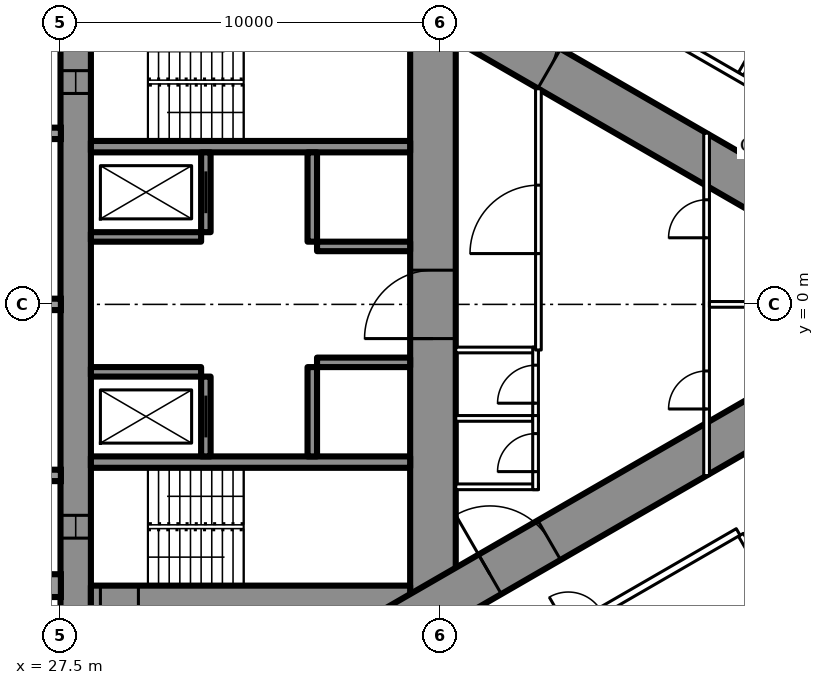
"""IFC4 building model, lengths in metres.
Left out: names, types, materials, properties, quantities, classifications, styles, units other than length and angle.
Written with IfcOpenShell. Run it as: python <this file> out.ifc"""

import sys

from ifc_helpers import new_model, si_unit, direction, frame, frame_2d, origin, place, context, subcontext, project, spatial, rectangle, extrude, element, fill, save


model = new_model("IFC4")
c1 = context("Model", 3, precision=1e-05, world=origin(), true_north=direction((0.0, 1.0)))
c2 = subcontext(c1, "Body", "Model", "MODEL_VIEW")
j1 = project(units=[si_unit("LENGTHUNIT", "METRE"), si_unit("PLANEANGLEUNIT", "RADIAN")], contexts=[c1])
p1 = place(None, origin())
s1 = spatial("IfcSite", under=j1, at=p1, CompositionType="ELEMENT")
p2 = place(p1, origin())
s2 = spatial("IfcBuilding", under=s1, at=p2, CompositionType="ELEMENT")
p3 = place(p2, frame((0.0, 0.0, 21.5)))
s3 = spatial("IfcBuildingStorey", under=s2, at=p3, CompositionType="ELEMENT", Elevation=21.5)
p4 = place(p3, frame((27.9, -8.6, 0.0), z_axis=(0.0, 0.0, 1.0), x_axis=(0.0, 1.0, 0.0)))
e1 = element("IfcWall", 1, at=p4, inside=s3, PredefinedType="SHEAR", context=c2, shape_type="SweptSolid", body=[
    extrude(rectangle(XDim=17.2, YDim=0.8, at=frame_2d((8.6, 0.0))), origin(), (0.0, 0.0, 1.0), 3.5),
])
p5 = place(p4, frame((2.45, 0.0, 0.6)))
e2 = element("IfcOpeningElement", 2, at=p5, cuts=e1, PredefinedType="OPENING", context=c2, shape_type="SweptSolid", body=[
    extrude(rectangle(XDim=0.6, YDim=2.1, at=frame_2d((0.3, 1.05))), frame((0.0, 0.41, 0.0), z_axis=(0.0, -1.0, 0.0), x_axis=(1.0, 0.0, 0.0)), (0.0, 0.0, 1.0), 0.82),
])
p6 = place(p4, frame((14.15, 0.0, 0.6)))
e3 = element("IfcOpeningElement", 3, at=p6, cuts=e1, PredefinedType="OPENING", context=c2, shape_type="SweptSolid", body=[
    extrude(rectangle(XDim=0.6, YDim=2.1, at=frame_2d((0.3, 1.05))), frame((0.0, 0.41, 0.0), z_axis=(0.0, -1.0, 0.0), x_axis=(1.0, 0.0, 0.0)), (0.0, 0.0, 1.0), 0.82),
])
p7 = place(p3, frame((37.3, -8.6, 0.0), z_axis=(0.0, 0.0, 1.0), x_axis=(0.0, 1.0, 0.0)))
e4 = element("IfcWall", 4, at=p7, inside=s3, PredefinedType="SHEAR", context=c2, shape_type="SweptSolid", body=[
    extrude(rectangle(XDim=17.2, YDim=1.2, at=frame_2d((8.6, 0.0))), origin(), (0.0, 0.0, 1.0), 3.5),
])
p8 = place(p7, frame((7.7, 0.0, 0.0)))
e5 = element("IfcOpeningElement", 5, at=p8, cuts=e4, PredefinedType="OPENING", context=c2, shape_type="SweptSolid", body=[
    extrude(rectangle(XDim=1.8, YDim=2.2, at=frame_2d((0.9, 1.1))), frame((0.0, 0.61, 0.0), z_axis=(0.0, -1.0, 0.0), x_axis=(1.0, 0.0, 0.0)), (0.0, 0.0, 1.0), 1.22),
])
p9 = place(p3, frame((28.3, -8.0, 0.0), z_axis=(0.0, 0.0, 1.0), x_axis=(1.0, 0.0, 0.0)))
e6 = element("IfcWall", 6, at=p9, inside=s3, PredefinedType="SHEAR", context=c2, shape_type="SweptSolid", body=[
    extrude(rectangle(XDim=8.4, YDim=1.2, at=frame_2d((4.2, 0.0))), origin(), (0.0, 0.0, 1.0), 3.5),
])
p10 = place(p9, frame((0.25, 0.0, 0.0)))
e7 = element("IfcOpeningElement", 7, at=p10, cuts=e6, PredefinedType="OPENING", context=c2, shape_type="SweptSolid", body=[
    extrude(rectangle(XDim=1.0, YDim=2.2, at=frame_2d((0.5, 1.1))), frame((0.0, 0.61, 0.0), z_axis=(0.0, -1.0, 0.0), x_axis=(1.0, 0.0, 0.0)), (0.0, 0.0, 1.0), 1.22),
])
for number, where, z_axis, x_axis in (
    (8, (28.3, -4.15, 0.0), (0.0, 0.0, 1.0), (1.0, 0.0, 0.0)),
    (9, (28.3, 4.15, 0.0), (0.0, 0.0, 1.0), (1.0, 0.0, 0.0)),
):
    element("IfcWall", number, at=place(p3, frame(where, z_axis=z_axis, x_axis=x_axis)), inside=s3, PredefinedType="SHEAR", context=c2, shape_type="SweptSolid", body=[
        extrude(rectangle(XDim=8.4, YDim=0.3, at=frame_2d((4.2, 0.0))), origin(), (0.0, 0.0, 1.0), 3.5),
    ])
p11 = place(p3, frame((31.325, -4.0, 0.0), z_axis=(0.0, 0.0, 1.0), x_axis=(0.0, 1.0, 0.0)))
e10 = element("IfcWall", 10, at=p11, inside=s3, PredefinedType="SHEAR", context=c2, shape_type="SweptSolid", body=[
    extrude(rectangle(XDim=2.1, YDim=0.25, at=frame_2d((1.05, 0.0))), origin(), (0.0, 0.0, 1.0), 3.5),
])
p12 = place(p11, frame((0.5, 0.0, 0.0)))
e11 = element("IfcOpeningElement", 11, at=p12, cuts=e10, PredefinedType="OPENING", context=c2, shape_type="SweptSolid", body=[
    extrude(rectangle(XDim=1.1, YDim=2.2, at=frame_2d((0.55, 1.1))), frame((0.0, 0.135, 0.0), z_axis=(0.0, -1.0, 0.0), x_axis=(1.0, 0.0, 0.0)), (0.0, 0.0, 1.0), 0.27),
])
p13 = place(p3, frame((34.125, -4.0, 0.0), z_axis=(0.0, 0.0, 1.0), x_axis=(0.0, 1.0, 0.0)))
e12 = element("IfcWall", 12, at=p13, inside=s3, PredefinedType="SHEAR", context=c2, shape_type="SweptSolid", body=[
    extrude(rectangle(XDim=2.35, YDim=0.25, at=frame_2d((1.175, 0.0))), origin(), (0.0, 0.0, 1.0), 3.5),
])
p14 = place(p3, frame((28.3, -1.775, 0.0), z_axis=(0.0, 0.0, 1.0), x_axis=(1.0, 0.0, 0.0)))
e13 = element("IfcWall", 13, at=p14, inside=s3, PredefinedType="SHEAR", context=c2, shape_type="SweptSolid", body=[
    extrude(rectangle(XDim=2.9, YDim=0.25, at=frame_2d((1.45, 0.0))), origin(), (0.0, 0.0, 1.0), 3.5),
])
p15 = place(p3, frame((34.25, -1.525, 0.0), z_axis=(0.0, 0.0, 1.0), x_axis=(1.0, 0.0, 0.0)))
e14 = element("IfcWall", 14, at=p15, inside=s3, PredefinedType="SHEAR", context=c2, shape_type="SweptSolid", body=[
    extrude(rectangle(XDim=2.45, YDim=0.25, at=frame_2d((1.225, 0.0))), origin(), (0.0, 0.0, 1.0), 3.5),
])
p16 = place(p3, frame((31.325, 1.9, 0.0), z_axis=(0.0, 0.0, 1.0), x_axis=(0.0, 1.0, 0.0)))
e15 = element("IfcWall", 15, at=p16, inside=s3, PredefinedType="SHEAR", context=c2, shape_type="SweptSolid", body=[
    extrude(rectangle(XDim=2.1, YDim=0.25, at=frame_2d((1.05, 0.0))), origin(), (0.0, 0.0, 1.0), 3.5),
])
p17 = place(p16, frame((0.5, 0.0, 0.0)))
e16 = element("IfcOpeningElement", 16, at=p17, cuts=e15, PredefinedType="OPENING", context=c2, shape_type="SweptSolid", body=[
    extrude(rectangle(XDim=1.1, YDim=2.2, at=frame_2d((0.55, 1.1))), frame((0.0, 0.135, 0.0), z_axis=(0.0, -1.0, 0.0), x_axis=(1.0, 0.0, 0.0)), (0.0, 0.0, 1.0), 0.27),
])
p18 = place(p3, frame((34.125, 1.65, 0.0), z_axis=(0.0, 0.0, 1.0), x_axis=(0.0, 1.0, 0.0)))
e17 = element("IfcWall", 17, at=p18, inside=s3, PredefinedType="SHEAR", context=c2, shape_type="SweptSolid", body=[
    extrude(rectangle(XDim=2.35, YDim=0.25, at=frame_2d((1.175, 0.0))), origin(), (0.0, 0.0, 1.0), 3.5),
])
p19 = place(p3, frame((28.3, 1.775, 0.0), z_axis=(0.0, 0.0, 1.0), x_axis=(1.0, 0.0, 0.0)))
e18 = element("IfcWall", 18, at=p19, inside=s3, PredefinedType="SHEAR", context=c2, shape_type="SweptSolid", body=[
    extrude(rectangle(XDim=2.9, YDim=0.25, at=frame_2d((1.45, 0.0))), origin(), (0.0, 0.0, 1.0), 3.5),
])
p20 = place(p3, frame((34.25, 1.525, 0.0), z_axis=(0.0, 0.0, 1.0), x_axis=(1.0, 0.0, 0.0)))
e19 = element("IfcWall", 19, at=p20, inside=s3, PredefinedType="SHEAR", context=c2, shape_type="SweptSolid", body=[
    extrude(rectangle(XDim=2.45, YDim=0.25, at=frame_2d((1.225, 0.0))), origin(), (0.0, 0.0, 1.0), 3.5),
])
p21 = place(p3, frame((27.2, -13.8, 0.0), z_axis=(0.0, 0.0, 1.0), x_axis=(0.866027159892, 0.499996958321, 0.0)))
e20 = element("IfcWall", 20, at=p21, inside=s3, PredefinedType="SHEAR", context=c2, shape_type="SweptSolid", body=[
    extrude(rectangle(XDim=27.947, YDim=1.2, at=frame_2d((13.973, 0.0))), origin(), (0.0, 0.0, 1.0), 3.5),
])
p22 = place(p21, frame((4.6, 0.0, 0.0)))
e21 = element("IfcOpeningElement", 21, at=p22, cuts=e20, PredefinedType="OPENING", context=c2, shape_type="SweptSolid", body=[
    extrude(rectangle(XDim=1.0, YDim=2.2, at=frame_2d((0.5, 1.1))), frame((0.0, 0.61, 0.0), z_axis=(0.0, -1.0, 0.0), x_axis=(1.0, 0.0, 0.0)), (0.0, 0.0, 1.0), 1.22),
])
p23 = place(p21, frame((13.395, 0.0, 0.0)))
e22 = element("IfcOpeningElement", 22, at=p23, cuts=e20, PredefinedType="OPENING", context=c2, shape_type="SweptSolid", body=[
    extrude(rectangle(XDim=1.8, YDim=2.2, at=frame_2d((0.9, 1.1))), frame((0.0, 0.61, 0.0), z_axis=(0.0, -1.0, 0.0), x_axis=(1.0, 0.0, 0.0)), (0.0, 0.0, 1.0), 1.22),
])
p24 = place(p3, frame((27.2, 13.8, 0.0), z_axis=(0.0, 0.0, 1.0), x_axis=(0.866024515034, -0.500001539357, 0.0)))
e23 = element("IfcWall", 23, at=p24, inside=s3, PredefinedType="SHEAR", context=c2, shape_type="SweptSolid", body=[
    extrude(rectangle(XDim=26.907, YDim=1.2, at=frame_2d((13.454, 0.0))), origin(), (0.0, 0.0, 1.0), 3.5),
])
p25 = place(p24, frame((4.6, 0.0, 0.0)))
e24 = element("IfcOpeningElement", 24, at=p25, cuts=e23, PredefinedType="OPENING", context=c2, shape_type="SweptSolid", body=[
    extrude(rectangle(XDim=1.0, YDim=2.2, at=frame_2d((0.5, 1.1))), frame((0.0, 0.61, 0.0), z_axis=(0.0, -1.0, 0.0), x_axis=(1.0, 0.0, 0.0)), (0.0, 0.0, 1.0), 1.22),
])
p26 = place(p24, frame((13.395, 0.0, 0.0)))
e25 = element("IfcOpeningElement", 25, at=p26, cuts=e23, PredefinedType="OPENING", context=c2, shape_type="SweptSolid", body=[
    extrude(rectangle(XDim=1.8, YDim=2.2, at=frame_2d((0.9, 1.1))), frame((0.0, 0.61, 0.0), z_axis=(0.0, -1.0, 0.0), x_axis=(1.0, 0.0, 0.0)), (0.0, 0.0, 1.0), 1.22),
])
p27 = place(p3, frame((45.403, -6.062, 0.0), z_axis=(0.0, 0.0, 1.0), x_axis=(0.500007077968, -0.866021317279, 0.0)))
e26 = element("IfcWall", 26, at=p27, inside=s3, PredefinedType="PARTITIONING", context=c2, shape_type="SweptSolid", body=[
    extrude(rectangle(XDim=12.721, YDim=0.15, at=frame_2d((6.361, 0.0))), origin(), (0.0, 0.0, 1.0), 3.25),
])
p28 = place(p3, frame((45.403, 6.062, 0.0), z_axis=(0.0, 0.0, 1.0), x_axis=(0.500013434677, 0.866017647131, 0.0)))
e27 = element("IfcWall", 27, at=p28, inside=s3, PredefinedType="PARTITIONING", context=c2, shape_type="SweptSolid", body=[
    extrude(rectangle(XDim=9.902, YDim=0.15, at=frame_2d((4.951, 0.0))), origin(), (0.0, 0.0, 1.0), 2.25),
])
p29 = place(p3, frame((36.834, 10.894, 0.0), z_axis=(0.0, 0.0, 1.0), x_axis=(0.866028157229, -0.499995230863, 0.0)))
e28 = element("IfcWall", 28, at=p29, inside=s3, PredefinedType="PARTITIONING", context=c2, shape_type="SweptSolid", body=[
    extrude(rectangle(XDim=21.667, YDim=0.2, at=frame_2d((10.833, 0.0))), origin(), (0.0, 0.0, 1.0), 3.25),
])
p30 = place(p29, frame((18.885, 0.0, 0.0)))
e29 = element("IfcOpeningElement", 29, at=p30, cuts=e28, PredefinedType="OPENING", context=c2, shape_type="SweptSolid", body=[
    extrude(rectangle(XDim=0.95, YDim=2.2, at=frame_2d((0.475, 1.1))), frame((0.0, 0.11, 0.0), z_axis=(0.0, -1.0, 0.0), x_axis=(1.0, 0.0, 0.0)), (0.0, 0.0, 1.0), 0.22),
])
p31 = place(p29, frame((14.835, 0.0, 0.0)))
e30 = element("IfcOpeningElement", 30, at=p31, cuts=e28, PredefinedType="OPENING", context=c2, shape_type="SweptSolid", body=[
    extrude(rectangle(XDim=0.95, YDim=2.2, at=frame_2d((0.475, 1.1))), frame((0.0, 0.11, 0.0), z_axis=(0.0, -1.0, 0.0), x_axis=(1.0, 0.0, 0.0)), (0.0, 0.0, 1.0), 0.22),
])
p32 = place(p29, frame((12.85, 0.0, 0.0)))
e31 = element("IfcOpeningElement", 31, at=p32, cuts=e28, PredefinedType="OPENING", context=c2, shape_type="SweptSolid", body=[
    extrude(rectangle(XDim=0.95, YDim=2.2, at=frame_2d((0.475, 1.1))), frame((0.0, 0.11, 0.0), z_axis=(0.0, -1.0, 0.0), x_axis=(1.0, 0.0, 0.0)), (0.0, 0.0, 1.0), 0.22),
])
p33 = place(p29, frame((1.542, 0.0, 0.0)))
e32 = element("IfcOpeningElement", 32, at=p33, cuts=e28, PredefinedType="OPENING", context=c2, shape_type="SweptSolid", body=[
    extrude(rectangle(XDim=0.95, YDim=2.2, at=frame_2d((0.475, 1.1))), frame((0.0, 0.11, 0.0), z_axis=(0.0, -1.0, 0.0), x_axis=(1.0, 0.0, 0.0)), (0.0, 0.0, 1.0), 0.22),
])
p34 = place(p3, frame((37.96, -10.243, 0.0), z_axis=(0.0, 0.0, 1.0), x_axis=(0.866024617314, 0.500001362204, 0.0)))
e33 = element("IfcWall", 33, at=p34, inside=s3, PredefinedType="PARTITIONING", context=c2, shape_type="SweptSolid", body=[
    extrude(rectangle(XDim=8.512, YDim=0.2, at=frame_2d((4.256, 0.0))), origin(), (0.0, 0.0, 1.0), 3.25),
])
p35 = place(p34, frame((3.35, 0.0, 0.0)))
e34 = element("IfcOpeningElement", 34, at=p35, cuts=e33, PredefinedType="OPENING", context=c2, shape_type="SweptSolid", body=[
    extrude(rectangle(XDim=1.0, YDim=2.2, at=frame_2d((0.5, 1.1))), frame((0.0, 0.11, 0.0), z_axis=(0.0, -1.0, 0.0), x_axis=(1.0, 0.0, 0.0)), (0.0, 0.0, 1.0), 0.22),
])
for number, where, z_axis, x_axis in (
    (35, (37.9, -1.2, 0.0), (0.0, 0.0, 1.0), (1.0, 0.0, 0.0)),
    (36, (37.9, -3.0, 0.0), (0.0, 0.0, 1.0), (1.0, 0.0, 0.0)),
    (37, (37.9, -4.8, 0.0), (0.0, 0.0, 1.0), (1.0, 0.0, 0.0)),
):
    element("IfcWall", number, at=place(p3, frame(where, z_axis=z_axis, x_axis=x_axis)), inside=s3, PredefinedType="PARTITIONING", context=c2, shape_type="SweptSolid", body=[
        extrude(rectangle(XDim=2.175, YDim=0.15, at=frame_2d((1.087, 0.0))), origin(), (0.0, 0.0, 1.0), 3.25),
    ])
p36 = place(p3, frame((40.0, -3.075, 0.0), z_axis=(0.0, 0.0, 1.0), x_axis=(0.0, 1.0, 0.0)))
e38 = element("IfcWall", 38, at=p36, inside=s3, PredefinedType="PARTITIONING", context=c2, shape_type="SweptSolid", body=[
    extrude(rectangle(XDim=1.95, YDim=0.15, at=frame_2d((0.975, 0.0))), origin(), (0.0, 0.0, 1.0), 3.25),
])
p37 = place(p36, frame((0.475, 0.0, 0.0)))
e39 = element("IfcOpeningElement", 39, at=p37, cuts=e38, PredefinedType="OPENING", context=c2, shape_type="SweptSolid", body=[
    extrude(rectangle(XDim=1.0, YDim=2.2, at=frame_2d((0.5, 1.1))), frame((0.0, 0.085, 0.0), z_axis=(0.0, -1.0, 0.0), x_axis=(1.0, 0.0, 0.0)), (0.0, 0.0, 1.0), 0.17),
])
p38 = place(p3, frame((40.0, -4.875, 0.0), z_axis=(0.0, 0.0, 1.0), x_axis=(0.0, 1.0, 0.0)))
e40 = element("IfcWall", 40, at=p38, inside=s3, PredefinedType="PARTITIONING", context=c2, shape_type="SweptSolid", body=[
    extrude(rectangle(XDim=1.95, YDim=0.15, at=frame_2d((0.975, 0.0))), origin(), (0.0, 0.0, 1.0), 3.25),
])
p39 = place(p38, frame((0.475, 0.0, 0.0)))
e41 = element("IfcOpeningElement", 41, at=p39, cuts=e40, PredefinedType="OPENING", context=c2, shape_type="SweptSolid", body=[
    extrude(rectangle(XDim=1.0, YDim=2.2, at=frame_2d((0.5, 1.1))), frame((0.0, 0.085, 0.0), z_axis=(0.0, -1.0, 0.0), x_axis=(1.0, 0.0, 0.0)), (0.0, 0.0, 1.0), 0.17),
])
p40 = place(p3, frame((40.075, -1.2, 0.0), z_axis=(0.0, 0.0, 1.0), x_axis=(0.0, 1.0, 0.0)))
e42 = element("IfcWall", 42, at=p40, inside=s3, PredefinedType="PARTITIONING", context=c2, shape_type="SweptSolid", body=[
    extrude(rectangle(XDim=6.874, YDim=0.15, at=frame_2d((3.437, 0.0))), origin(), (0.0, 0.0, 1.0), 3.25),
])
p41 = place(p40, frame((2.537, 0.0, 0.0)))
e43 = element("IfcOpeningElement", 43, at=p41, cuts=e42, PredefinedType="OPENING", context=c2, shape_type="SweptSolid", body=[
    extrude(rectangle(XDim=1.8, YDim=2.2, at=frame_2d((0.9, 1.1))), frame((0.0, 0.085, 0.0), z_axis=(0.0, -1.0, 0.0), x_axis=(1.0, 0.0, 0.0)), (0.0, 0.0, 1.0), 0.17),
])
p42 = place(p3, frame((44.5, -4.505, 0.0), z_axis=(0.0, 0.0, 1.0), x_axis=(0.0, 1.0, 0.0)))
e44 = element("IfcWall", 44, at=p42, inside=s3, PredefinedType="PARTITIONING", context=c2, shape_type="SweptSolid", body=[
    extrude(rectangle(XDim=9.009, YDim=0.15, at=frame_2d((4.505, 0.0))), origin(), (0.0, 0.0, 1.0), 2.45),
])
p43 = place(p42, frame((1.752, 0.0, 0.0)))
e45 = element("IfcOpeningElement", 45, at=p43, cuts=e44, PredefinedType="OPENING", context=c2, shape_type="SweptSolid", body=[
    extrude(rectangle(XDim=1.0, YDim=2.2, at=frame_2d((0.5, 1.1))), frame((0.0, 0.085, 0.0), z_axis=(0.0, -1.0, 0.0), x_axis=(1.0, 0.0, 0.0)), (0.0, 0.0, 1.0), 0.17),
])
p44 = place(p42, frame((6.257, 0.0, 0.0)))
e46 = element("IfcOpeningElement", 46, at=p44, cuts=e44, PredefinedType="OPENING", context=c2, shape_type="SweptSolid", body=[
    extrude(rectangle(XDim=1.0, YDim=2.2, at=frame_2d((0.5, 1.1))), frame((0.0, 0.085, 0.0), z_axis=(0.0, -1.0, 0.0), x_axis=(1.0, 0.0, 0.0)), (0.0, 0.0, 1.0), 0.17),
])
p45 = place(p3, frame((44.575, 0.0, 0.0), z_axis=(0.0, 0.0, 1.0), x_axis=(1.0, 0.0, 0.0)))
e47 = element("IfcWall", 47, at=p45, inside=s3, PredefinedType="PARTITIONING", context=c2, shape_type="SweptSolid", body=[
    extrude(rectangle(XDim=7.727, YDim=0.15, at=frame_2d((3.864, 0.0))), origin(), (0.0, 0.0, 1.0), 2.25),
])
p46 = place(p37, origin())
e48 = element("IfcDoor", 48, at=p46, inside=s3, OperationType="SINGLE_SWING_LEFT", PredefinedType="DOOR", context=c2, shape_type="SweptSolid", body=[
    extrude(rectangle(XDim=1.0, YDim=2.2, at=frame_2d((0.5, 1.1))), frame((0.0, 0.025, 0.0), z_axis=(0.0, -1.0, 0.0), x_axis=(1.0, 0.0, 0.0)), (0.0, 0.0, 1.0), 0.05),
])
fill(e39, e48)
p47 = place(p39, origin())
e49 = element("IfcDoor", 49, at=p47, inside=s3, OperationType="SINGLE_SWING_LEFT", PredefinedType="DOOR", context=c2, shape_type="SweptSolid", body=[
    extrude(rectangle(XDim=1.0, YDim=2.2, at=frame_2d((0.5, 1.1))), frame((0.0, 0.025, 0.0), z_axis=(0.0, -1.0, 0.0), x_axis=(1.0, 0.0, 0.0)), (0.0, 0.0, 1.0), 0.05),
])
fill(e41, e49)
p48 = place(p41, origin())
e50 = element("IfcDoor", 50, at=p48, inside=s3, OperationType="DOUBLE_DOOR_SINGLE_SWING", PredefinedType="DOOR", context=c2, shape_type="SweptSolid", body=[
    extrude(rectangle(XDim=1.8, YDim=2.2, at=frame_2d((0.9, 1.1))), frame((0.0, 0.025, 0.0), z_axis=(0.0, -1.0, 0.0), x_axis=(1.0, 0.0, 0.0)), (0.0, 0.0, 1.0), 0.05),
])
fill(e43, e50)
p49 = place(p43, origin())
e51 = element("IfcDoor", 51, at=p49, inside=s3, OperationType="SINGLE_SWING_LEFT", PredefinedType="DOOR", context=c2, shape_type="SweptSolid", body=[
    extrude(rectangle(XDim=1.0, YDim=2.2, at=frame_2d((0.5, 1.1))), frame((0.0, 0.025, 0.0), z_axis=(0.0, -1.0, 0.0), x_axis=(1.0, 0.0, 0.0)), (0.0, 0.0, 1.0), 0.05),
])
fill(e45, e51)
p50 = place(p44, origin())
e52 = element("IfcDoor", 52, at=p50, inside=s3, OperationType="SINGLE_SWING_LEFT", PredefinedType="DOOR", context=c2, shape_type="SweptSolid", body=[
    extrude(rectangle(XDim=1.0, YDim=2.2, at=frame_2d((0.5, 1.1))), frame((0.0, 0.025, 0.0), z_axis=(0.0, -1.0, 0.0), x_axis=(1.0, 0.0, 0.0)), (0.0, 0.0, 1.0), 0.05),
])
fill(e46, e52)
p51 = place(p23, origin())
e53 = element("IfcDoor", 53, at=p51, inside=s3, OperationType="DOUBLE_DOOR_SINGLE_SWING", PredefinedType="DOOR", context=c2, shape_type="SweptSolid", body=[
    extrude(rectangle(XDim=1.8, YDim=2.2, at=frame_2d((0.9, 1.1))), frame((0.0, 0.025, 0.0), z_axis=(0.0, -1.0, 0.0), x_axis=(1.0, 0.0, 0.0)), (0.0, 0.0, 1.0), 0.05),
])
fill(e22, e53)
p52 = place(p26, origin())
e54 = element("IfcDoor", 54, at=p52, inside=s3, OperationType="DOUBLE_DOOR_SINGLE_SWING", PredefinedType="DOOR", context=c2, shape_type="SweptSolid", body=[
    extrude(rectangle(XDim=1.8, YDim=2.2, at=frame_2d((0.9, 1.1))), frame((0.0, 0.025, 0.0), z_axis=(0.0, -1.0, 0.0), x_axis=(1.0, 0.0, 0.0)), (0.0, 0.0, 1.0), 0.05),
])
fill(e25, e54)
p53 = place(p8, origin())
e55 = element("IfcDoor", 55, at=p53, inside=s3, OperationType="DOUBLE_DOOR_SINGLE_SWING", PredefinedType="DOOR", context=c2, shape_type="SweptSolid", body=[
    extrude(rectangle(XDim=1.8, YDim=2.2, at=frame_2d((0.9, 1.1))), frame((0.0, 0.025, 0.0), z_axis=(0.0, -1.0, 0.0), x_axis=(1.0, 0.0, 0.0)), (0.0, 0.0, 1.0), 0.05),
])
fill(e5, e55)
p54 = place(p12, origin())
e56 = element("IfcDoor", 56, at=p54, inside=s3, OperationType="SLIDING_TO_LEFT", PredefinedType="USERDEFINED", context=c2, shape_type="SweptSolid", body=[
    extrude(rectangle(XDim=1.1, YDim=2.2, at=frame_2d((0.55, 1.1))), frame((0.0, 0.025, 0.0), z_axis=(0.0, -1.0, 0.0), x_axis=(1.0, 0.0, 0.0)), (0.0, 0.0, 1.0), 0.05),
])
fill(e11, e56)
p55 = place(p17, origin())
e57 = element("IfcDoor", 57, at=p55, inside=s3, OperationType="SLIDING_TO_LEFT", PredefinedType="USERDEFINED", context=c2, shape_type="SweptSolid", body=[
    extrude(rectangle(XDim=1.1, YDim=2.2, at=frame_2d((0.55, 1.1))), frame((0.0, 0.025, 0.0), z_axis=(0.0, -1.0, 0.0), x_axis=(1.0, 0.0, 0.0)), (0.0, 0.0, 1.0), 0.05),
])
fill(e16, e57)
p56 = place(p5, origin())
e58 = element("IfcWindow", 58, at=p56, inside=s3, PartitioningType="SINGLE_PANEL", PredefinedType="WINDOW", context=c2, shape_type="SweptSolid", body=[
    extrude(rectangle(XDim=0.6, YDim=2.1, at=frame_2d((0.3, 1.05))), frame((0.0, 0.03, 0.0), z_axis=(0.0, -1.0, 0.0), x_axis=(1.0, 0.0, 0.0)), (0.0, 0.0, 1.0), 0.06),
])
fill(e2, e58)
p57 = place(p6, origin())
e59 = element("IfcWindow", 59, at=p57, inside=s3, PartitioningType="SINGLE_PANEL", PredefinedType="WINDOW", context=c2, shape_type="SweptSolid", body=[
    extrude(rectangle(XDim=0.6, YDim=2.1, at=frame_2d((0.3, 1.05))), frame((0.0, 0.03, 0.0), z_axis=(0.0, -1.0, 0.0), x_axis=(1.0, 0.0, 0.0)), (0.0, 0.0, 1.0), 0.06),
])
fill(e3, e59)
save(model, sys.argv[1])
